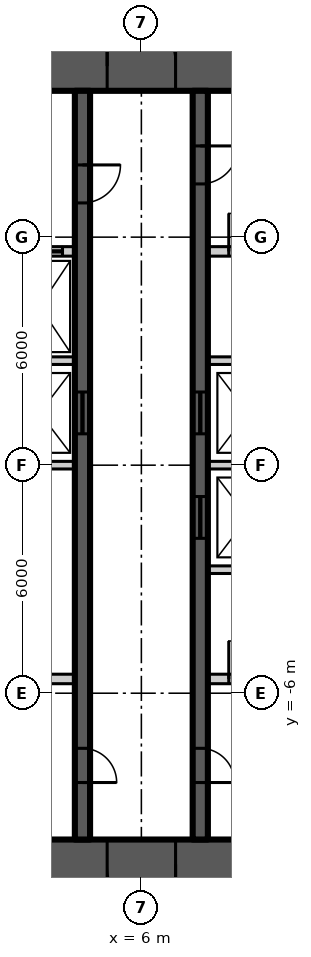
"""IFC4 building model, lengths in metres.
Left out: names, types, materials, properties, quantities, classifications, styles, units other than length and angle.
Written with IfcOpenShell. Run it as: python <this file> out.ifc"""

import sys

from ifc_helpers import new_model, si_unit, direction, frame, frame_2d, origin, place, context, subcontext, project, spatial, rectangle, extrude, element, fill, save


model = new_model("IFC4")
c1 = context("Model", 3, precision=1e-05, world=origin(), true_north=direction((0.0, 1.0)))
c2 = subcontext(c1, "Body", "Model", "MODEL_VIEW")
j1 = project(units=[si_unit("LENGTHUNIT", "METRE"), si_unit("PLANEANGLEUNIT", "RADIAN")], contexts=[c1])
p1 = place(None, origin())
s1 = spatial("IfcSite", under=j1, at=p1, CompositionType="ELEMENT")
p2 = place(p1, origin())
s2 = spatial("IfcBuilding", under=s1, at=p2, CompositionType="ELEMENT")
p3 = place(p2, frame((0.0, 0.0, 279.0)))
s3 = spatial("IfcBuildingStorey", under=s2, at=p3, CompositionType="ELEMENT", Elevation=279.0)
p4 = place(p3, frame((-11.15, 10.5, 0.0), z_axis=(0.0, 0.0, 1.0), x_axis=(1.0, 0.0, 0.0)))
e1 = element("IfcWall", 1, at=p4, inside=s3, PredefinedType="SHEAR", context=c2, shape_type="SweptSolid", body=[
    extrude(rectangle(XDim=22.3, YDim=1.3, at=frame_2d((11.15, 0.0))), origin(), (0.0, 0.0, 1.0), 3.9),
])
p5 = place(p4, frame((4.25, 0.0, 0.0)))
e2 = element("IfcOpeningElement", 2, at=p5, cuts=e1, PredefinedType="OPENING", context=c2, shape_type="SweptSolid", body=[
    extrude(rectangle(XDim=1.8, YDim=2.2, at=frame_2d((0.9, 1.1))), frame((0.0, 0.66, 0.0), z_axis=(0.0, -1.0, 0.0), x_axis=(1.0, 0.0, 0.0)), (0.0, 0.0, 1.0), 1.32),
])
p6 = place(p4, frame((16.25, 0.0, 0.0)))
e3 = element("IfcOpeningElement", 3, at=p6, cuts=e1, PredefinedType="OPENING", context=c2, shape_type="SweptSolid", body=[
    extrude(rectangle(XDim=1.8, YDim=2.2, at=frame_2d((0.9, 1.1))), frame((0.0, 0.66, 0.0), z_axis=(0.0, -1.0, 0.0), x_axis=(1.0, 0.0, 0.0)), (0.0, 0.0, 1.0), 1.32),
])
p7 = place(p3, frame((11.15, -10.5, 0.0), z_axis=(0.0, 0.0, 1.0), x_axis=(-1.0, 0.0, 0.0)))
e4 = element("IfcWall", 4, at=p7, inside=s3, PredefinedType="SHEAR", context=c2, shape_type="SweptSolid", body=[
    extrude(rectangle(XDim=22.3, YDim=1.3, at=frame_2d((11.15, 0.0))), origin(), (0.0, 0.0, 1.0), 3.9),
])
p8 = place(p7, frame((16.25, 0.0, 0.0)))
e5 = element("IfcOpeningElement", 5, at=p8, cuts=e4, PredefinedType="OPENING", context=c2, shape_type="SweptSolid", body=[
    extrude(rectangle(XDim=1.8, YDim=2.2, at=frame_2d((0.9, 1.1))), frame((0.0, 0.66, 0.0), z_axis=(0.0, -1.0, 0.0), x_axis=(1.0, 0.0, 0.0)), (0.0, 0.0, 1.0), 1.32),
])
p9 = place(p7, frame((4.25, 0.0, 0.0)))
e6 = element("IfcOpeningElement", 6, at=p9, cuts=e4, PredefinedType="OPENING", context=c2, shape_type="SweptSolid", body=[
    extrude(rectangle(XDim=1.8, YDim=2.2, at=frame_2d((0.9, 1.1))), frame((0.0, 0.66, 0.0), z_axis=(0.0, -1.0, 0.0), x_axis=(1.0, 0.0, 0.0)), (0.0, 0.0, 1.0), 1.32),
])
p10 = place(p3, frame((7.55, 9.85, 0.0), z_axis=(0.0, 0.0, 1.0), x_axis=(0.0, -1.0, 0.0)))
e7 = element("IfcWall", 7, at=p10, inside=s3, PredefinedType="SHEAR", context=c2, shape_type="SweptSolid", body=[
    extrude(rectangle(XDim=19.7, YDim=0.4, at=frame_2d((9.85, 0.0))), origin(), (0.0, 0.0, 1.0), 3.9),
])
p11 = place(p10, frame((1.45, 0.0, 0.0)))
e8 = element("IfcOpeningElement", 8, at=p11, cuts=e7, PredefinedType="OPENING", context=c2, shape_type="SweptSolid", body=[
    extrude(rectangle(XDim=1.0, YDim=2.2, at=frame_2d((0.5, 1.1))), frame((0.0, 0.21, 0.0), z_axis=(0.0, -1.0, 0.0), x_axis=(1.0, 0.0, 0.0)), (0.0, 0.0, 1.0), 0.42),
])
p12 = place(p10, frame((17.3, 0.0, 0.0)))
e9 = element("IfcOpeningElement", 9, at=p12, cuts=e7, PredefinedType="OPENING", context=c2, shape_type="SweptSolid", body=[
    extrude(rectangle(XDim=0.9, YDim=2.1, at=frame_2d((0.45, 1.05))), frame((0.0, 0.21, 0.0), z_axis=(0.0, -1.0, 0.0), x_axis=(1.0, 0.0, 0.0)), (0.0, 0.0, 1.0), 0.42),
])
p13 = place(p10, frame((7.925, 0.0, 0.0)))
e10 = element("IfcOpeningElement", 10, at=p13, cuts=e7, PredefinedType="OPENING", context=c2, shape_type="SweptSolid", body=[
    extrude(rectangle(XDim=1.1, YDim=2.2, at=frame_2d((0.55, 1.1))), frame((0.0, 0.21, 0.0), z_axis=(0.0, -1.0, 0.0), x_axis=(1.0, 0.0, 0.0)), (0.0, 0.0, 1.0), 0.42),
])
p14 = place(p10, frame((10.675, 0.0, 0.0)))
e11 = element("IfcOpeningElement", 11, at=p14, cuts=e7, PredefinedType="OPENING", context=c2, shape_type="SweptSolid", body=[
    extrude(rectangle(XDim=1.1, YDim=2.2, at=frame_2d((0.55, 1.1))), frame((0.0, 0.21, 0.0), z_axis=(0.0, -1.0, 0.0), x_axis=(1.0, 0.0, 0.0)), (0.0, 0.0, 1.0), 0.42),
])
p15 = place(p3, frame((4.45, 9.85, 0.0), z_axis=(0.0, 0.0, 1.0), x_axis=(0.0, -1.0, 0.0)))
e12 = element("IfcWall", 12, at=p15, inside=s3, PredefinedType="SHEAR", context=c2, shape_type="SweptSolid", body=[
    extrude(rectangle(XDim=19.7, YDim=0.4, at=frame_2d((9.85, 0.0))), origin(), (0.0, 0.0, 1.0), 3.9),
])
p16 = place(p15, frame((1.95, 0.0, 0.0)))
e13 = element("IfcOpeningElement", 13, at=p16, cuts=e12, PredefinedType="OPENING", context=c2, shape_type="SweptSolid", body=[
    extrude(rectangle(XDim=1.0, YDim=2.2, at=frame_2d((0.5, 1.1))), frame((0.0, 0.21, 0.0), z_axis=(0.0, -1.0, 0.0), x_axis=(1.0, 0.0, 0.0)), (0.0, 0.0, 1.0), 0.42),
])
p17 = place(p15, frame((17.3, 0.0, 0.0)))
e14 = element("IfcOpeningElement", 14, at=p17, cuts=e12, PredefinedType="OPENING", context=c2, shape_type="SweptSolid", body=[
    extrude(rectangle(XDim=0.9, YDim=2.1, at=frame_2d((0.45, 1.05))), frame((0.0, 0.21, 0.0), z_axis=(0.0, -1.0, 0.0), x_axis=(1.0, 0.0, 0.0)), (0.0, 0.0, 1.0), 0.42),
])
p18 = place(p15, frame((7.925, 0.0, 0.0)))
e15 = element("IfcOpeningElement", 15, at=p18, cuts=e12, PredefinedType="OPENING", context=c2, shape_type="SweptSolid", body=[
    extrude(rectangle(XDim=1.1, YDim=2.2, at=frame_2d((0.55, 1.1))), frame((0.0, 0.21, 0.0), z_axis=(0.0, -1.0, 0.0), x_axis=(1.0, 0.0, 0.0)), (0.0, 0.0, 1.0), 0.42),
])
p19 = place(p3, frame((2.4, 5.625, 0.0), z_axis=(0.0, 0.0, 1.0), x_axis=(1.0, 0.0, 0.0)))
e16 = element("IfcWall", 16, at=p19, inside=s3, PredefinedType="SOLIDWALL", context=c2, shape_type="SweptSolid", body=[
    extrude(rectangle(XDim=1.85, YDim=0.25, at=frame_2d((0.925, 0.0))), origin(), (0.0, 0.0, 1.0), 3.7),
])
p20 = place(p19, frame((0.325, 0.0, 0.0)))
e17 = element("IfcOpeningElement", 17, at=p20, cuts=e16, PredefinedType="OPENING", context=c2, shape_type="SweptSolid", body=[
    extrude(rectangle(XDim=1.2, YDim=2.2, at=frame_2d((0.6, 1.1))), frame((0.0, 0.135, 0.0), z_axis=(0.0, -1.0, 0.0), x_axis=(1.0, 0.0, 0.0)), (0.0, 0.0, 1.0), 0.27),
])
p21 = place(p3, frame((7.75, 5.625, 0.0), z_axis=(0.0, 0.0, 1.0), x_axis=(1.0, 0.0, 0.0)))
e18 = element("IfcWall", 18, at=p21, inside=s3, PredefinedType="SOLIDWALL", context=c2, shape_type="SweptSolid", body=[
    extrude(rectangle(XDim=2.1, YDim=0.25, at=frame_2d((1.05, 0.0))), origin(), (0.0, 0.0, 1.0), 3.7),
])
p22 = place(p21, frame((0.55, 0.0, 0.0)))
e19 = element("IfcOpeningElement", 19, at=p22, cuts=e18, PredefinedType="OPENING", context=c2, shape_type="SweptSolid", body=[
    extrude(rectangle(XDim=1.0, YDim=2.2, at=frame_2d((0.5, 1.1))), frame((0.0, 0.135, 0.0), z_axis=(0.0, -1.0, 0.0), x_axis=(1.0, 0.0, 0.0)), (0.0, 0.0, 1.0), 0.27),
])
p23 = place(p3, frame((2.4, -5.625, 0.0), z_axis=(0.0, 0.0, 1.0), x_axis=(1.0, 0.0, 0.0)))
e20 = element("IfcWall", 20, at=p23, inside=s3, PredefinedType="SOLIDWALL", context=c2, shape_type="SweptSolid", body=[
    extrude(rectangle(XDim=1.85, YDim=0.25, at=frame_2d((0.925, 0.0))), origin(), (0.0, 0.0, 1.0), 3.7),
])
p24 = place(p3, frame((7.75, -5.625, 0.0), z_axis=(0.0, 0.0, 1.0), x_axis=(1.0, 0.0, 0.0)))
e21 = element("IfcWall", 21, at=p24, inside=s3, PredefinedType="SOLIDWALL", context=c2, shape_type="SweptSolid", body=[
    extrude(rectangle(XDim=2.1, YDim=0.25, at=frame_2d((1.05, 0.0))), origin(), (0.0, 0.0, 1.0), 3.7),
])
p25 = place(p24, frame((0.55, 0.0, 0.0)))
e22 = element("IfcOpeningElement", 22, at=p25, cuts=e21, PredefinedType="OPENING", context=c2, shape_type="SweptSolid", body=[
    extrude(rectangle(XDim=1.0, YDim=2.2, at=frame_2d((0.5, 1.1))), frame((0.0, 0.135, 0.0), z_axis=(0.0, -1.0, 0.0), x_axis=(1.0, 0.0, 0.0)), (0.0, 0.0, 1.0), 0.27),
])
p26 = place(p3, frame((7.75, -2.75, 0.0), z_axis=(0.0, 0.0, 1.0), x_axis=(1.0, 0.0, 0.0)))
e23 = element("IfcWall", 23, at=p26, inside=s3, PredefinedType="SOLIDWALL", context=c2, shape_type="SweptSolid", body=[
    extrude(rectangle(XDim=2.1, YDim=0.2, at=frame_2d((1.05, 0.0))), origin(), (0.0, 0.0, 1.0), 3.7),
])
p27 = place(p3, frame((2.4, 0.0, 0.0), z_axis=(0.0, 0.0, 1.0), x_axis=(1.0, 0.0, 0.0)))
e24 = element("IfcWall", 24, at=p27, inside=s3, PredefinedType="SOLIDWALL", context=c2, shape_type="SweptSolid", body=[
    extrude(rectangle(XDim=1.85, YDim=0.2, at=frame_2d((0.925, 0.0))), origin(), (0.0, 0.0, 1.0), 3.7),
])
p28 = place(p3, frame((7.75, 0.0, 0.0), z_axis=(0.0, 0.0, 1.0), x_axis=(1.0, 0.0, 0.0)))
e25 = element("IfcWall", 25, at=p28, inside=s3, PredefinedType="SOLIDWALL", context=c2, shape_type="SweptSolid", body=[
    extrude(rectangle(XDim=2.1, YDim=0.2, at=frame_2d((1.05, 0.0))), origin(), (0.0, 0.0, 1.0), 3.7),
])
p29 = place(p3, frame((2.4, 2.75, 0.0), z_axis=(0.0, 0.0, 1.0), x_axis=(1.0, 0.0, 0.0)))
e26 = element("IfcWall", 26, at=p29, inside=s3, PredefinedType="SOLIDWALL", context=c2, shape_type="SweptSolid", body=[
    extrude(rectangle(XDim=1.85, YDim=0.2, at=frame_2d((0.925, 0.0))), origin(), (0.0, 0.0, 1.0), 3.7),
])
p30 = place(p3, frame((7.75, 2.75, 0.0), z_axis=(0.0, 0.0, 1.0), x_axis=(1.0, 0.0, 0.0)))
e27 = element("IfcWall", 27, at=p30, inside=s3, PredefinedType="SOLIDWALL", context=c2, shape_type="SweptSolid", body=[
    extrude(rectangle(XDim=2.1, YDim=0.2, at=frame_2d((1.05, 0.0))), origin(), (0.0, 0.0, 1.0), 3.7),
])
p31 = place(p6, origin())
e28 = element("IfcDoor", 28, at=p31, inside=s3, OperationType="DOUBLE_DOOR_DOUBLE_SWING", PredefinedType="DOOR", context=c2, shape_type="SweptSolid", body=[
    extrude(rectangle(XDim=1.8, YDim=2.2, at=frame_2d((0.9, 1.1))), frame((0.0, 0.025, 0.0), z_axis=(0.0, -1.0, 0.0), x_axis=(1.0, 0.0, 0.0)), (0.0, 0.0, 1.0), 0.05),
])
fill(e3, e28)
p32 = place(p9, origin())
e29 = element("IfcDoor", 29, at=p32, inside=s3, OperationType="DOUBLE_DOOR_DOUBLE_SWING", PredefinedType="DOOR", context=c2, shape_type="SweptSolid", body=[
    extrude(rectangle(XDim=1.8, YDim=2.2, at=frame_2d((0.9, 1.1))), frame((0.0, 0.025, 0.0), z_axis=(0.0, -1.0, 0.0), x_axis=(1.0, 0.0, 0.0)), (0.0, 0.0, 1.0), 0.05),
])
fill(e6, e29)
p33 = place(p11, origin())
e30 = element("IfcDoor", 30, at=p33, inside=s3, OperationType="SINGLE_SWING_LEFT", PredefinedType="DOOR", context=c2, shape_type="SweptSolid", body=[
    extrude(rectangle(XDim=1.0, YDim=2.2, at=frame_2d((0.5, 1.1))), frame((0.0, 0.025, 0.0), z_axis=(0.0, -1.0, 0.0), x_axis=(1.0, 0.0, 0.0)), (0.0, 0.0, 1.0), 0.05),
])
fill(e8, e30)
p34 = place(p16, origin())
e31 = element("IfcDoor", 31, at=p34, inside=s3, OperationType="SINGLE_SWING_LEFT", PredefinedType="DOOR", context=c2, shape_type="SweptSolid", body=[
    extrude(rectangle(XDim=1.0, YDim=2.2, at=frame_2d((0.5, 1.1))), frame((0.0, 0.025, 0.0), z_axis=(0.0, -1.0, 0.0), x_axis=(1.0, 0.0, 0.0)), (0.0, 0.0, 1.0), 0.05),
])
fill(e13, e31)
p35 = place(p12, origin())
e32 = element("IfcDoor", 32, at=p35, inside=s3, OperationType="SINGLE_SWING_RIGHT", PredefinedType="DOOR", context=c2, shape_type="SweptSolid", body=[
    extrude(rectangle(XDim=0.9, YDim=2.1, at=frame_2d((0.45, 1.05))), frame((0.0, 0.025, 0.0), z_axis=(0.0, -1.0, 0.0), x_axis=(1.0, 0.0, 0.0)), (0.0, 0.0, 1.0), 0.05),
])
fill(e9, e32)
p36 = place(p17, origin())
e33 = element("IfcDoor", 33, at=p36, inside=s3, OperationType="SINGLE_SWING_RIGHT", PredefinedType="DOOR", context=c2, shape_type="SweptSolid", body=[
    extrude(rectangle(XDim=0.9, YDim=2.1, at=frame_2d((0.45, 1.05))), frame((0.0, 0.025, 0.0), z_axis=(0.0, -1.0, 0.0), x_axis=(1.0, 0.0, 0.0)), (0.0, 0.0, 1.0), 0.05),
])
fill(e14, e33)
p37 = place(p13, origin())
e34 = element("IfcDoor", 34, at=p37, inside=s3, OperationType="SLIDING_TO_LEFT", PredefinedType="DOOR", context=c2, shape_type="SweptSolid", body=[
    extrude(rectangle(XDim=1.1, YDim=2.2, at=frame_2d((0.55, 1.1))), frame((0.0, 0.025, 0.0), z_axis=(0.0, -1.0, 0.0), x_axis=(1.0, 0.0, 0.0)), (0.0, 0.0, 1.0), 0.05),
])
fill(e10, e34)
p38 = place(p14, origin())
e35 = element("IfcDoor", 35, at=p38, inside=s3, OperationType="SLIDING_TO_LEFT", PredefinedType="DOOR", context=c2, shape_type="SweptSolid", body=[
    extrude(rectangle(XDim=1.1, YDim=2.2, at=frame_2d((0.55, 1.1))), frame((0.0, 0.025, 0.0), z_axis=(0.0, -1.0, 0.0), x_axis=(1.0, 0.0, 0.0)), (0.0, 0.0, 1.0), 0.05),
])
fill(e11, e35)
p39 = place(p18, origin())
e36 = element("IfcDoor", 36, at=p39, inside=s3, OperationType="SLIDING_TO_LEFT", PredefinedType="DOOR", context=c2, shape_type="SweptSolid", body=[
    extrude(rectangle(XDim=1.1, YDim=2.2, at=frame_2d((0.55, 1.1))), frame((0.0, 0.025, 0.0), z_axis=(0.0, -1.0, 0.0), x_axis=(1.0, 0.0, 0.0)), (0.0, 0.0, 1.0), 0.05),
])
fill(e15, e36)
p40 = place(p20, origin())
e37 = element("IfcDoor", 37, at=p40, inside=s3, OperationType="SLIDING_TO_LEFT", PredefinedType="DOOR", context=c2, shape_type="SweptSolid", body=[
    extrude(rectangle(XDim=1.2, YDim=2.2, at=frame_2d((0.6, 1.1))), frame((0.0, 0.025, 0.0), z_axis=(0.0, -1.0, 0.0), x_axis=(1.0, 0.0, 0.0)), (0.0, 0.0, 1.0), 0.05),
])
fill(e17, e37)
p41 = place(p22, origin())
e38 = element("IfcDoor", 38, at=p41, inside=s3, OperationType="SINGLE_SWING_LEFT", PredefinedType="DOOR", context=c2, shape_type="SweptSolid", body=[
    extrude(rectangle(XDim=1.0, YDim=2.2, at=frame_2d((0.5, 1.1))), frame((0.0, 0.025, 0.0), z_axis=(0.0, -1.0, 0.0), x_axis=(1.0, 0.0, 0.0)), (0.0, 0.0, 1.0), 0.05),
])
fill(e19, e38)
p42 = place(p25, origin())
e39 = element("IfcDoor", 39, at=p42, inside=s3, OperationType="SINGLE_SWING_LEFT", PredefinedType="DOOR", context=c2, shape_type="SweptSolid", body=[
    extrude(rectangle(XDim=1.0, YDim=2.2, at=frame_2d((0.5, 1.1))), frame((0.0, 0.025, 0.0), z_axis=(0.0, -1.0, 0.0), x_axis=(1.0, 0.0, 0.0)), (0.0, 0.0, 1.0), 0.05),
])
fill(e22, e39)
save(model, sys.argv[1])
